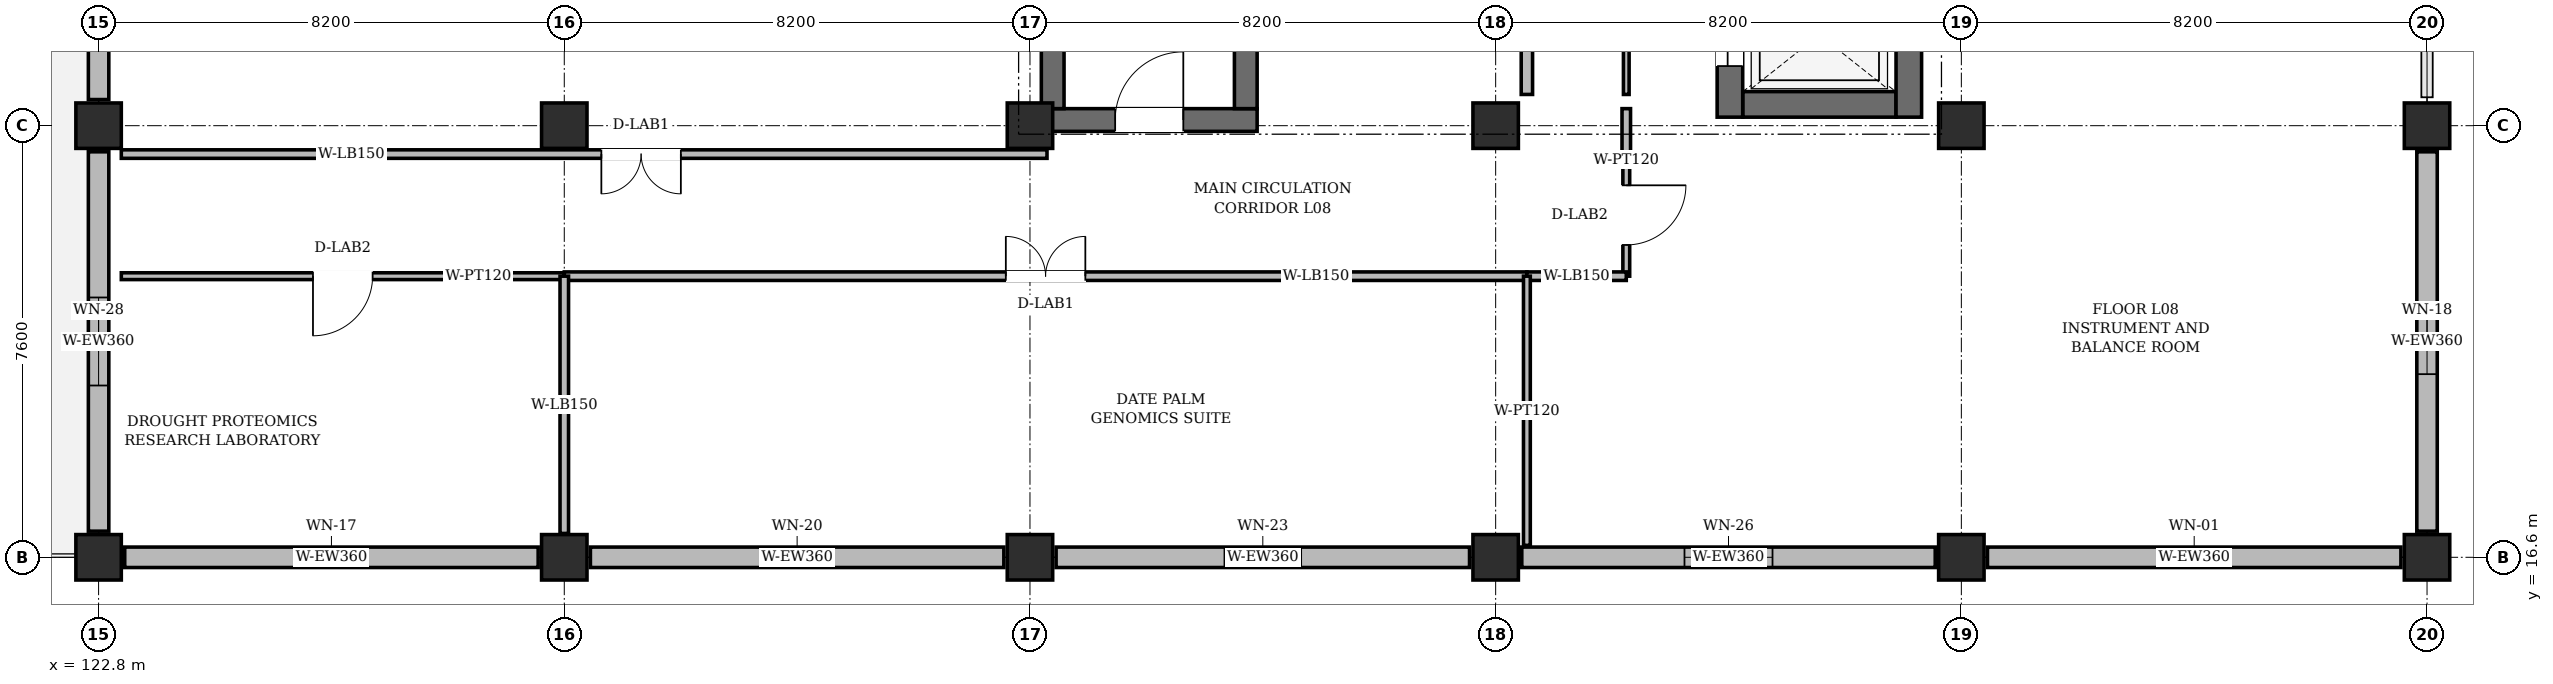
"""IFC4 building model, lengths in metres.
Left out: names, types, materials, properties, quantities, classifications, styles, units other than length and angle.
Written with IfcOpenShell. Run it as: python <this file> out.ifc"""

import sys

from ifc_helpers import new_model, si_unit, direction, frame, frame_2d, origin, origin_2d, place, context, subcontext, project, spatial, rectangle, extrude, element, fill, save


model = new_model("IFC4")
c1 = context("Model", 3, precision=1e-05, world=origin(), true_north=direction((0.0, 1.0)))
c2 = subcontext(c1, "Body", "Model", "MODEL_VIEW")
j1 = project(units=[si_unit("LENGTHUNIT", "METRE"), si_unit("PLANEANGLEUNIT", "RADIAN")], contexts=[c1])
p1 = place(None, origin())
s1 = spatial("IfcSite", under=j1, at=p1, CompositionType="ELEMENT")
p2 = place(p1, origin())
s2 = spatial("IfcBuilding", under=s1, at=p2, CompositionType="ELEMENT")
p3 = place(p2, frame((0.0, 0.0, 36.6)))
s3 = spatial("IfcBuildingStorey", under=s2, at=p3, CompositionType="ELEMENT", Elevation=36.6)
for number, where, z_axis, x_axis in (
    (1, (122.8, 16.6, 0.0), (0.0, 0.0, 1.0), (1.0, 0.0, 0.0)),
    (2, (122.8, 24.2, 0.0), (0.0, 0.0, 1.0), (1.0, 0.0, 0.0)),
    (3, (131.0, 16.6, 0.0), (0.0, 0.0, 1.0), (1.0, 0.0, 0.0)),
    (4, (131.0, 24.2, 0.0), (0.0, 0.0, 1.0), (1.0, 0.0, 0.0)),
    (5, (139.2, 16.6, 0.0), (0.0, 0.0, 1.0), (1.0, 0.0, 0.0)),
    (6, (139.2, 24.2, 0.0), (0.0, 0.0, 1.0), (1.0, 0.0, 0.0)),
    (7, (147.4, 16.6, 0.0), (0.0, 0.0, 1.0), (1.0, 0.0, 0.0)),
    (8, (147.4, 24.2, 0.0), (0.0, 0.0, 1.0), (1.0, 0.0, 0.0)),
    (9, (155.6, 16.6, 0.0), (0.0, 0.0, 1.0), (1.0, 0.0, 0.0)),
    (10, (155.6, 24.2, 0.0), (0.0, 0.0, 1.0), (1.0, 0.0, 0.0)),
    (11, (163.8, 16.6, 0.0), (0.0, 0.0, 1.0), (1.0, 0.0, 0.0)),
    (12, (163.8, 24.2, 0.0), (0.0, 0.0, 1.0), (1.0, 0.0, 0.0)),
):
    element("IfcColumn", number, at=place(p3, frame(where, z_axis=z_axis, x_axis=x_axis)), inside=s3, PredefinedType="COLUMN", context=c2, shape_type="SweptSolid", body=[
        extrude(rectangle(XDim=0.8, YDim=0.8, at=origin_2d()), origin(), (0.0, 0.0, 1.0), 3.95),
    ])
p4 = place(p3, frame((123.26, 16.6, 0.0), z_axis=(0.0, 0.0, 1.0), x_axis=(1.0, 0.0, 0.0)))
e13 = element("IfcWall", 13, at=p4, inside=s3, PredefinedType="SOLIDWALL", context=c2, shape_type="SweptSolid", body=[
    extrude(rectangle(XDim=7.28, YDim=0.36, at=frame_2d((3.64, 0.0))), origin(), (0.0, 0.0, 1.0), 3.335),
])
p5 = place(p4, frame((3.065, 0.0, 0.95)))
e14 = element("IfcOpeningElement", 14, at=p5, cuts=e13, PredefinedType="OPENING", context=c2, shape_type="SweptSolid", body=[
    extrude(rectangle(XDim=1.15, YDim=1.25, at=frame_2d((0.575, 0.625))), frame((0.0, 0.192, 0.0), z_axis=(0.0, -1.0, 0.0), x_axis=(1.0, 0.0, 0.0)), (0.0, 0.0, 1.0), 0.384),
])
p6 = place(p3, frame((131.46, 16.6, 0.0), z_axis=(0.0, 0.0, 1.0), x_axis=(1.0, 0.0, 0.0)))
e15 = element("IfcWall", 15, at=p6, inside=s3, PredefinedType="SOLIDWALL", context=c2, shape_type="SweptSolid", body=[
    extrude(rectangle(XDim=7.28, YDim=0.36, at=frame_2d((3.64, 0.0))), origin(), (0.0, 0.0, 1.0), 3.335),
])
p7 = place(p6, frame((3.065, 0.0, 0.95)))
e16 = element("IfcOpeningElement", 16, at=p7, cuts=e15, PredefinedType="OPENING", context=c2, shape_type="SweptSolid", body=[
    extrude(rectangle(XDim=1.15, YDim=2.05, at=frame_2d((0.575, 1.025))), frame((0.0, 0.192, 0.0), z_axis=(0.0, -1.0, 0.0), x_axis=(1.0, 0.0, 0.0)), (0.0, 0.0, 1.0), 0.384),
])
p8 = place(p3, frame((139.66, 16.6, 0.0), z_axis=(0.0, 0.0, 1.0), x_axis=(1.0, 0.0, 0.0)))
e17 = element("IfcWall", 17, at=p8, inside=s3, PredefinedType="SOLIDWALL", context=c2, shape_type="SweptSolid", body=[
    extrude(rectangle(XDim=7.28, YDim=0.36, at=frame_2d((3.64, 0.0))), origin(), (0.0, 0.0, 1.0), 3.335),
])
p9 = place(p8, frame((2.965, 0.0, 0.95)))
e18 = element("IfcOpeningElement", 18, at=p9, cuts=e17, PredefinedType="OPENING", context=c2, shape_type="SweptSolid", body=[
    extrude(rectangle(XDim=1.35, YDim=1.75, at=frame_2d((0.675, 0.875))), frame((0.0, 0.192, 0.0), z_axis=(0.0, -1.0, 0.0), x_axis=(1.0, 0.0, 0.0)), (0.0, 0.0, 1.0), 0.384),
])
p10 = place(p3, frame((147.86, 16.6, 0.0), z_axis=(0.0, 0.0, 1.0), x_axis=(1.0, 0.0, 0.0)))
e19 = element("IfcWall", 19, at=p10, inside=s3, PredefinedType="SOLIDWALL", context=c2, shape_type="SweptSolid", body=[
    extrude(rectangle(XDim=7.28, YDim=0.36, at=frame_2d((3.64, 0.0))), origin(), (0.0, 0.0, 1.0), 3.335),
])
p11 = place(p10, frame((2.865, 0.0, 0.95)))
e20 = element("IfcOpeningElement", 20, at=p11, cuts=e19, PredefinedType="OPENING", context=c2, shape_type="SweptSolid", body=[
    extrude(rectangle(XDim=1.55, YDim=1.5, at=frame_2d((0.775, 0.75))), frame((0.0, 0.192, 0.0), z_axis=(0.0, -1.0, 0.0), x_axis=(1.0, 0.0, 0.0)), (0.0, 0.0, 1.0), 0.384),
])
p12 = place(p3, frame((156.06, 16.6, 0.0), z_axis=(0.0, 0.0, 1.0), x_axis=(1.0, 0.0, 0.0)))
e21 = element("IfcWall", 21, at=p12, inside=s3, PredefinedType="SOLIDWALL", context=c2, shape_type="SweptSolid", body=[
    extrude(rectangle(XDim=7.28, YDim=0.36, at=frame_2d((3.64, 0.0))), origin(), (0.0, 0.0, 1.0), 3.335),
])
p13 = place(p12, frame((3.19, 0.0, 0.95)))
e22 = element("IfcOpeningElement", 22, at=p13, cuts=e21, PredefinedType="OPENING", context=c2, shape_type="SweptSolid", body=[
    extrude(rectangle(XDim=0.9, YDim=2.1, at=frame_2d((0.45, 1.05))), frame((0.0, 0.192, 0.0), z_axis=(0.0, -1.0, 0.0), x_axis=(1.0, 0.0, 0.0)), (0.0, 0.0, 1.0), 0.384),
])
p14 = place(p3, frame((163.8, 17.06, 0.0), z_axis=(0.0, 0.0, 1.0), x_axis=(0.0, 1.0, 0.0)))
e23 = element("IfcWall", 23, at=p14, inside=s3, PredefinedType="SOLIDWALL", context=c2, shape_type="SweptSolid", body=[
    extrude(rectangle(XDim=6.68, YDim=0.36, at=frame_2d((3.34, 0.0))), origin(), (0.0, 0.0, 1.0), 3.335),
])
p15 = place(p14, frame((2.765, 0.0, 0.95)))
e24 = element("IfcOpeningElement", 24, at=p15, cuts=e23, PredefinedType="OPENING", context=c2, shape_type="SweptSolid", body=[
    extrude(rectangle(XDim=1.15, YDim=1.5, at=frame_2d((0.575, 0.75))), frame((0.0, 0.192, 0.0), z_axis=(0.0, -1.0, 0.0), x_axis=(1.0, 0.0, 0.0)), (0.0, 0.0, 1.0), 0.384),
])
p16 = place(p3, frame((122.8, 31.34, 0.0), z_axis=(0.0, 0.0, 1.0), x_axis=(0.0, -1.0, 0.0)))
e25 = element("IfcWall", 25, at=p16, inside=s3, PredefinedType="SOLIDWALL", context=c2, shape_type="SweptSolid", body=[
    extrude(rectangle(XDim=6.68, YDim=0.36, at=frame_2d((3.34, 0.0))), origin(), (0.0, 0.0, 1.0), 3.335),
])
p17 = place(p16, frame((2.54, 0.0, 0.0)))
e26 = element("IfcOpeningElement", 26, at=p17, cuts=e25, PredefinedType="OPENING", context=c2, shape_type="SweptSolid", body=[
    extrude(rectangle(XDim=1.6, YDim=2.2, at=frame_2d((0.8, 1.1))), frame((0.0, 0.192, 0.0), z_axis=(0.0, -1.0, 0.0), x_axis=(1.0, 0.0, 0.0)), (0.0, 0.0, 1.0), 0.384),
])
p18 = place(p3, frame((122.8, 23.74, 0.0), z_axis=(0.0, 0.0, 1.0), x_axis=(0.0, -1.0, 0.0)))
e27 = element("IfcWall", 27, at=p18, inside=s3, PredefinedType="SOLIDWALL", context=c2, shape_type="SweptSolid", body=[
    extrude(rectangle(XDim=6.68, YDim=0.36, at=frame_2d((3.34, 0.0))), origin(), (0.0, 0.0, 1.0), 3.335),
])
p19 = place(p18, frame((2.565, 0.0, 0.95)))
e28 = element("IfcOpeningElement", 28, at=p19, cuts=e27, PredefinedType="OPENING", context=c2, shape_type="SweptSolid", body=[
    extrude(rectangle(XDim=1.55, YDim=2.05, at=frame_2d((0.775, 1.025))), frame((0.0, 0.192, 0.0), z_axis=(0.0, -1.0, 0.0), x_axis=(1.0, 0.0, 0.0)), (0.0, 0.0, 1.0), 0.384),
])
p20 = place(p3, frame((139.4, 24.3, 0.0), z_axis=(0.0, 0.0, 1.0), x_axis=(1.0, 0.0, 0.0)))
e29 = element("IfcWall", 29, at=p20, inside=s3, PredefinedType="SHEAR", context=c2, shape_type="SweptSolid", body=[
    extrude(rectangle(XDim=3.8, YDim=0.4, at=frame_2d((1.9, 0.0))), origin(), (0.0, 0.0, 1.0), 3.95),
])
p21 = place(p20, frame((1.3, 0.0, 0.0)))
e30 = element("IfcOpeningElement", 30, at=p21, cuts=e29, PredefinedType="OPENING", context=c2, shape_type="SweptSolid", body=[
    extrude(rectangle(XDim=1.2, YDim=2.2, at=frame_2d((0.6, 1.1))), frame((0.0, 0.212, 0.0), z_axis=(0.0, -1.0, 0.0), x_axis=(1.0, 0.0, 0.0)), (0.0, 0.0, 1.0), 0.424),
])
for number, where, z_axis, x_axis in (
    (31, (139.6, 24.5, 0.0), (0.0, 0.0, 1.0), (0.0, 1.0, 0.0)),
    (32, (143.0, 24.5, 0.0), (0.0, 0.0, 1.0), (0.0, 1.0, 0.0)),
):
    element("IfcWall", number, at=place(p3, frame(where, z_axis=z_axis, x_axis=x_axis)), inside=s3, PredefinedType="SHEAR", context=c2, shape_type="SweptSolid", body=[
        extrude(rectangle(XDim=7.0, YDim=0.4, at=frame_2d((3.5, 0.0))), origin(), (0.0, 0.0, 1.0), 3.95),
    ])
p22 = place(p3, frame((151.75, 24.575, 0.0), z_axis=(0.0, 0.0, 1.0), x_axis=(1.0, 0.0, 0.0)))
e33 = element("IfcWall", 33, at=p22, inside=s3, PredefinedType="SHEAR", context=c2, shape_type="SweptSolid", body=[
    extrude(rectangle(XDim=2.7, YDim=0.45, at=frame_2d((1.35, 0.0))), origin(), (0.0, 0.0, 1.0), 3.95),
])
p23 = place(p3, frame((151.525, 24.35, 0.0), z_axis=(0.0, 0.0, 1.0), x_axis=(0.0, 1.0, 0.0)))
e34 = element("IfcWall", 34, at=p23, inside=s3, PredefinedType="SHEAR", context=c2, shape_type="SweptSolid", body=[
    extrude(rectangle(XDim=2.9, YDim=0.45, at=frame_2d((1.45, 0.0))), origin(), (0.0, 0.0, 1.0), 3.95),
])
p24 = place(p23, frame((0.9, 0.0, 0.0)))
e35 = element("IfcOpeningElement", 35, at=p24, cuts=e34, PredefinedType="OPENING", context=c2, shape_type="SweptSolid", body=[
    extrude(rectangle(XDim=1.1, YDim=2.2, at=frame_2d((0.55, 1.1))), frame((0.0, 0.237, 0.0), z_axis=(0.0, -1.0, 0.0), x_axis=(1.0, 0.0, 0.0)), (0.0, 0.0, 1.0), 0.474),
])
p25 = place(p3, frame((154.675, 24.35, 0.0), z_axis=(0.0, 0.0, 1.0), x_axis=(0.0, 1.0, 0.0)))
e36 = element("IfcWall", 36, at=p25, inside=s3, PredefinedType="SHEAR", context=c2, shape_type="SweptSolid", body=[
    extrude(rectangle(XDim=2.9, YDim=0.45, at=frame_2d((1.45, 0.0))), origin(), (0.0, 0.0, 1.0), 3.95),
])
p26 = place(p3, frame((147.95, 31.75, 0.0), z_axis=(0.0, 0.0, 1.0), x_axis=(0.0, -1.0, 0.0)))
e37 = element("IfcWall", 37, at=p26, inside=s3, PredefinedType="PARTITIONING", context=c2, shape_type="SweptSolid", body=[
    extrude(rectangle(XDim=7.0, YDim=0.2, at=frame_2d((3.5, 0.0))), origin(), (0.0, 0.0, 1.0), 3.805),
])
p27 = place(p26, frame((2.75, 0.0, 0.0)))
e38 = element("IfcOpeningElement", 38, at=p27, cuts=e37, PredefinedType="OPENING", context=c2, shape_type="SweptSolid", body=[
    extrude(rectangle(XDim=1.5, YDim=2.2, at=frame_2d((0.75, 1.1))), frame((0.0, 0.112, 0.0), z_axis=(0.0, -1.0, 0.0), x_axis=(1.0, 0.0, 0.0)), (0.0, 0.0, 1.0), 0.224),
])
p28 = place(p3, frame((149.7, 24.75, 0.0), z_axis=(0.0, 0.0, 1.0), x_axis=(0.0, 1.0, 0.0)))
e39 = element("IfcWall", 39, at=p28, inside=s3, PredefinedType="PARTITIONING", context=c2, shape_type="SweptSolid", body=[
    extrude(rectangle(XDim=11.3, YDim=0.1, at=frame_2d((5.65, 0.0))), origin(), (0.0, 0.0, 1.0), 3.805),
])
p29 = place(p28, frame((4.75, 0.0, 0.0)))
e40 = element("IfcOpeningElement", 40, at=p29, cuts=e39, PredefinedType="OPENING", context=c2, shape_type="SweptSolid", body=[
    extrude(rectangle(XDim=1.8, YDim=2.4, at=frame_2d((0.9, 1.2))), frame((0.0, 0.062, 0.0), z_axis=(0.0, -1.0, 0.0), x_axis=(1.0, 0.0, 0.0)), (0.0, 0.0, 1.0), 0.124),
])
p30 = place(p3, frame((131.0, 21.55, 0.0), z_axis=(0.0, 0.0, 1.0), x_axis=(-1.0, 0.0, 0.0)))
e41 = element("IfcWall", 41, at=p30, inside=s3, PredefinedType="PARTITIONING", context=c2, shape_type="SweptSolid", body=[
    extrude(rectangle(XDim=7.8, YDim=0.12, at=frame_2d((3.9, 0.0))), origin(), (0.0, 0.0, 1.0), 3.625),
])
p31 = place(p30, frame((3.375, 0.0, 0.0)))
e42 = element("IfcOpeningElement", 42, at=p31, cuts=e41, PredefinedType="OPENING", context=c2, shape_type="SweptSolid", body=[
    extrude(rectangle(XDim=1.05, YDim=2.2, at=frame_2d((0.525, 1.1))), frame((0.0, 0.072, 0.0), z_axis=(0.0, -1.0, 0.0), x_axis=(1.0, 0.0, 0.0)), (0.0, 0.0, 1.0), 0.144),
])
p32 = place(p3, frame((147.95, 21.55, 0.0), z_axis=(0.0, 0.0, 1.0), x_axis=(-1.0, 0.0, 0.0)))
e43 = element("IfcWall", 43, at=p32, inside=s3, PredefinedType="PARTITIONING", context=c2, shape_type="SweptSolid", body=[
    extrude(rectangle(XDim=16.95, YDim=0.15, at=frame_2d((8.475, 0.0))), origin(), (0.0, 0.0, 1.0), 3.525),
])
p33 = place(p32, frame((7.775, 0.0, 0.0)))
e44 = element("IfcOpeningElement", 44, at=p33, cuts=e43, PredefinedType="OPENING", context=c2, shape_type="SweptSolid", body=[
    extrude(rectangle(XDim=1.4, YDim=2.2, at=frame_2d((0.7, 1.1))), frame((0.0, 0.087, 0.0), z_axis=(0.0, -1.0, 0.0), x_axis=(1.0, 0.0, 0.0)), (0.0, 0.0, 1.0), 0.174),
])
p34 = place(p3, frame((149.7, 24.5, 0.0), z_axis=(0.0, 0.0, 1.0), x_axis=(0.0, -1.0, 0.0)))
e45 = element("IfcWall", 45, at=p34, inside=s3, PredefinedType="PARTITIONING", context=c2, shape_type="SweptSolid", body=[
    extrude(rectangle(XDim=0.8, YDim=0.15, at=frame_2d((0.4, 0.0))), origin(), (0.0, 0.0, 1.0), 3.805),
])
p35 = place(p3, frame((149.7, 23.7, 0.0), z_axis=(0.0, 0.0, 1.0), x_axis=(0.0, -1.0, 0.0)))
e46 = element("IfcWall", 46, at=p35, inside=s3, PredefinedType="PARTITIONING", context=c2, shape_type="SweptSolid", body=[
    extrude(rectangle(XDim=2.15, YDim=0.12, at=frame_2d((1.075, 0.0))), origin(), (0.0, 0.0, 1.0), 3.805),
])
p36 = place(p35, frame((0.55, 0.0, 0.0)))
e47 = element("IfcOpeningElement", 47, at=p36, cuts=e46, PredefinedType="OPENING", context=c2, shape_type="SweptSolid", body=[
    extrude(rectangle(XDim=1.05, YDim=2.2, at=frame_2d((0.525, 1.1))), frame((0.0, 0.072, 0.0), z_axis=(0.0, -1.0, 0.0), x_axis=(1.0, 0.0, 0.0)), (0.0, 0.0, 1.0), 0.144),
])
p37 = place(p3, frame((149.7, 21.55, 0.0), z_axis=(0.0, 0.0, 1.0), x_axis=(-1.0, 0.0, 0.0)))
e48 = element("IfcWall", 48, at=p37, inside=s3, PredefinedType="PARTITIONING", context=c2, shape_type="SweptSolid", body=[
    extrude(rectangle(XDim=1.75, YDim=0.15, at=frame_2d((0.875, 0.0))), origin(), (0.0, 0.0, 1.0), 3.525),
])
p38 = place(p3, frame((123.2, 23.7, 0.0), z_axis=(0.0, 0.0, 1.0), x_axis=(1.0, 0.0, 0.0)))
e49 = element("IfcWall", 49, at=p38, inside=s3, PredefinedType="PARTITIONING", context=c2, shape_type="SweptSolid", body=[
    extrude(rectangle(XDim=16.3, YDim=0.15, at=frame_2d((8.15, 0.0))), origin(), (0.0, 0.0, 1.0), 3.805),
])
p39 = place(p38, frame((8.453, 0.0, 0.0)))
e50 = element("IfcOpeningElement", 50, at=p39, cuts=e49, PredefinedType="OPENING", context=c2, shape_type="SweptSolid", body=[
    extrude(rectangle(XDim=1.4, YDim=2.2, at=frame_2d((0.7, 1.1))), frame((0.0, 0.087, 0.0), z_axis=(0.0, -1.0, 0.0), x_axis=(1.0, 0.0, 0.0)), (0.0, 0.0, 1.0), 0.174),
])
p40 = place(p3, frame((131.0, 21.55, 0.0), z_axis=(0.0, 0.0, 1.0), x_axis=(0.0, -1.0, 0.0)))
e51 = element("IfcWall", 51, at=p40, inside=s3, PredefinedType="PARTITIONING", context=c2, shape_type="SweptSolid", body=[
    extrude(rectangle(XDim=4.53, YDim=0.15, at=frame_2d((2.265, 0.0))), origin(), (0.0, 0.0, 1.0), 3.285),
])
p41 = place(p3, frame((147.95, 21.55, 0.0), z_axis=(0.0, 0.0, 1.0), x_axis=(0.0, -1.0, 0.0)))
e52 = element("IfcWall", 52, at=p41, inside=s3, PredefinedType="PARTITIONING", context=c2, shape_type="SweptSolid", body=[
    extrude(rectangle(XDim=4.74, YDim=0.12, at=frame_2d((2.37, 0.0))), origin(), (0.0, 0.0, 1.0), 3.805),
])
p42 = place(p5, origin())
e53 = element("IfcWindow", 53, at=p42, inside=s3, PartitioningType="SINGLE_PANEL", PredefinedType="WINDOW", context=c2, shape_type="SweptSolid", body=[
    extrude(rectangle(XDim=1.15, YDim=1.25, at=frame_2d((0.575, 0.625))), frame((0.0, 0.03, 0.0), z_axis=(0.0, -1.0, 0.0), x_axis=(1.0, 0.0, 0.0)), (0.0, 0.0, 1.0), 0.06),
])
fill(e14, e53)
p43 = place(p7, origin())
e54 = element("IfcWindow", 54, at=p43, inside=s3, PartitioningType="SINGLE_PANEL", PredefinedType="WINDOW", context=c2, shape_type="SweptSolid", body=[
    extrude(rectangle(XDim=1.15, YDim=2.05, at=frame_2d((0.575, 1.025))), frame((0.0, 0.03, 0.0), z_axis=(0.0, -1.0, 0.0), x_axis=(1.0, 0.0, 0.0)), (0.0, 0.0, 1.0), 0.06),
])
fill(e16, e54)
p44 = place(p9, origin())
e55 = element("IfcWindow", 55, at=p44, inside=s3, PartitioningType="SINGLE_PANEL", PredefinedType="WINDOW", context=c2, shape_type="SweptSolid", body=[
    extrude(rectangle(XDim=1.35, YDim=1.75, at=frame_2d((0.675, 0.875))), frame((0.0, 0.03, 0.0), z_axis=(0.0, -1.0, 0.0), x_axis=(1.0, 0.0, 0.0)), (0.0, 0.0, 1.0), 0.06),
])
fill(e18, e55)
p45 = place(p11, origin())
e56 = element("IfcWindow", 56, at=p45, inside=s3, PartitioningType="DOUBLE_PANEL_VERTICAL", PredefinedType="WINDOW", context=c2, shape_type="SweptSolid", body=[
    extrude(rectangle(XDim=1.55, YDim=1.5, at=frame_2d((0.775, 0.75))), frame((0.0, 0.03, 0.0), z_axis=(0.0, -1.0, 0.0), x_axis=(1.0, 0.0, 0.0)), (0.0, 0.0, 1.0), 0.06),
])
fill(e20, e56)
p46 = place(p13, origin())
e57 = element("IfcWindow", 57, at=p46, inside=s3, PartitioningType="SINGLE_PANEL", PredefinedType="WINDOW", context=c2, shape_type="SweptSolid", body=[
    extrude(rectangle(XDim=0.9, YDim=2.1, at=frame_2d((0.45, 1.05))), frame((0.0, 0.03, 0.0), z_axis=(0.0, -1.0, 0.0), x_axis=(1.0, 0.0, 0.0)), (0.0, 0.0, 1.0), 0.06),
])
fill(e22, e57)
p47 = place(p15, origin())
e58 = element("IfcWindow", 58, at=p47, inside=s3, PartitioningType="SINGLE_PANEL", PredefinedType="WINDOW", context=c2, shape_type="SweptSolid", body=[
    extrude(rectangle(XDim=1.15, YDim=1.5, at=frame_2d((0.575, 0.75))), frame((0.0, 0.03, 0.0), z_axis=(0.0, -1.0, 0.0), x_axis=(1.0, 0.0, 0.0)), (0.0, 0.0, 1.0), 0.06),
])
fill(e24, e58)
p48 = place(p19, origin())
e59 = element("IfcWindow", 59, at=p48, inside=s3, PartitioningType="DOUBLE_PANEL_VERTICAL", PredefinedType="WINDOW", context=c2, shape_type="SweptSolid", body=[
    extrude(rectangle(XDim=1.55, YDim=2.05, at=frame_2d((0.775, 1.025))), frame((0.0, 0.03, 0.0), z_axis=(0.0, -1.0, 0.0), x_axis=(1.0, 0.0, 0.0)), (0.0, 0.0, 1.0), 0.06),
])
fill(e28, e59)
p49 = place(p21, origin())
e60 = element("IfcDoor", 60, at=p49, inside=s3, OperationType="SINGLE_SWING_RIGHT", PredefinedType="DOOR", context=c2, shape_type="SweptSolid", body=[
    extrude(rectangle(XDim=1.2, YDim=2.2, at=frame_2d((0.6, 1.1))), frame((0.0, 0.025, 0.0), z_axis=(0.0, -1.0, 0.0), x_axis=(1.0, 0.0, 0.0)), (0.0, 0.0, 1.0), 0.05),
])
fill(e30, e60)
p50 = place(p24, origin())
e61 = element("IfcDoor", 61, at=p50, inside=s3, OperationType="DOUBLE_DOOR_SLIDING", PredefinedType="DOOR", context=c2, shape_type="SweptSolid", body=[
    extrude(rectangle(XDim=1.1, YDim=2.2, at=frame_2d((0.55, 1.1))), frame((0.0, 0.025, 0.0), z_axis=(0.0, -1.0, 0.0), x_axis=(1.0, 0.0, 0.0)), (0.0, 0.0, 1.0), 0.05),
])
fill(e35, e61)
p51 = place(p31, origin())
e62 = element("IfcDoor", 62, at=p51, inside=s3, OperationType="SINGLE_SWING_RIGHT", PredefinedType="DOOR", context=c2, shape_type="SweptSolid", body=[
    extrude(rectangle(XDim=1.05, YDim=2.2, at=frame_2d((0.525, 1.1))), frame((0.0, 0.025, 0.0), z_axis=(0.0, -1.0, 0.0), x_axis=(1.0, 0.0, 0.0)), (0.0, 0.0, 1.0), 0.05),
])
fill(e42, e62)
p52 = place(p33, frame((1.4, 0.0, 0.0), z_axis=(0.0, 0.0, 1.0), x_axis=(-1.0, 0.0, 0.0)))
e63 = element("IfcDoor", 63, at=p52, inside=s3, OperationType="DOUBLE_DOOR_SINGLE_SWING", PredefinedType="DOOR", context=c2, shape_type="SweptSolid", body=[
    extrude(rectangle(XDim=1.4, YDim=2.2, at=frame_2d((0.7, 1.1))), frame((0.0, 0.025, 0.0), z_axis=(0.0, -1.0, 0.0), x_axis=(1.0, 0.0, 0.0)), (0.0, 0.0, 1.0), 0.05),
])
fill(e44, e63)
p53 = place(p36, origin())
e64 = element("IfcDoor", 64, at=p53, inside=s3, OperationType="SINGLE_SWING_LEFT", PredefinedType="DOOR", context=c2, shape_type="SweptSolid", body=[
    extrude(rectangle(XDim=1.05, YDim=2.2, at=frame_2d((0.525, 1.1))), frame((0.0, 0.025, 0.0), z_axis=(0.0, -1.0, 0.0), x_axis=(1.0, 0.0, 0.0)), (0.0, 0.0, 1.0), 0.05),
])
fill(e47, e64)
p54 = place(p39, frame((1.4, 0.0, 0.0), z_axis=(0.0, 0.0, 1.0), x_axis=(-1.0, 0.0, 0.0)))
e65 = element("IfcDoor", 65, at=p54, inside=s3, OperationType="DOUBLE_DOOR_SINGLE_SWING", PredefinedType="DOOR", context=c2, shape_type="SweptSolid", body=[
    extrude(rectangle(XDim=1.4, YDim=2.2, at=frame_2d((0.7, 1.1))), frame((0.0, 0.025, 0.0), z_axis=(0.0, -1.0, 0.0), x_axis=(1.0, 0.0, 0.0)), (0.0, 0.0, 1.0), 0.05),
])
fill(e50, e65)
save(model, sys.argv[1])
